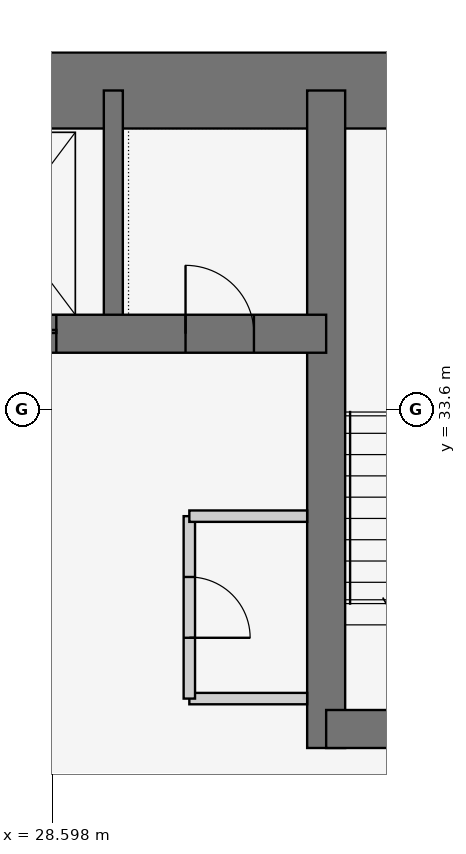
"""IFC4 building model, lengths in metres.
Left out: names, types, materials, properties, quantities, classifications, styles, units other than length and angle.
Written with IfcOpenShell. Run it as: python <this file> out.ifc"""

import sys

from ifc_helpers import new_model, si_unit, direction, frame, frame_2d, origin, place, context, subcontext, project, spatial, rectangle, extrude, element, fill, save


model = new_model("IFC4")
c1 = context("Model", 3, precision=1e-05, world=origin(), true_north=direction((0.0, 1.0)))
c2 = subcontext(c1, "Body", "Model", "MODEL_VIEW")
j1 = project(units=[si_unit("LENGTHUNIT", "METRE"), si_unit("PLANEANGLEUNIT", "RADIAN")], contexts=[c1])
p1 = place(None, origin())
s1 = spatial("IfcSite", under=j1, at=p1, CompositionType="ELEMENT")
p2 = place(p1, origin())
s2 = spatial("IfcBuilding", under=s1, at=p2, CompositionType="ELEMENT")
p3 = place(p2, frame((0.0, 0.0, 66.9)))
s3 = spatial("IfcBuildingStorey", under=s2, at=p3, CompositionType="ELEMENT", Elevation=66.9)
p4 = place(p3, frame((37.8, 37.8, 0.0), z_axis=(0.0, 0.0, 1.0), x_axis=(-1.0, 0.0, 0.0)))
e1 = element("IfcWall", 1, at=p4, inside=s3, PredefinedType="SHEAR", context=c2, shape_type="SweptSolid", body=[
    extrude(rectangle(XDim=17.3, YDim=1.0, at=frame_2d((8.65, 0.0))), origin(), (0.0, 0.0, 1.0), 3.6),
])
p5 = place(p3, frame((21.0, 34.6, 0.0), z_axis=(0.0, 0.0, 1.0), x_axis=(1.0, 0.0, 0.0)))
e2 = element("IfcWall", 2, at=p5, inside=s3, PredefinedType="SHEAR", context=c2, shape_type="SweptSolid", body=[
    extrude(rectangle(XDim=11.2, YDim=0.5, at=frame_2d((5.6, 0.0))), origin(), (0.0, 0.0, 1.0), 3.6),
])
p6 = place(p5, frame((9.35, 0.0, 0.0)))
e3 = element("IfcOpeningElement", 3, at=p6, cuts=e2, PredefinedType="OPENING", context=c2, shape_type="SweptSolid", body=[
    extrude(rectangle(XDim=0.9, YDim=2.1, at=frame_2d((0.45, 1.05))), frame((0.0, 0.26, 0.0), z_axis=(0.0, -1.0, 0.0), x_axis=(1.0, 0.0, 0.0)), (0.0, 0.0, 1.0), 0.52),
])
p7 = place(p5, frame((1.0, 0.0, 0.0)))
e4 = element("IfcOpeningElement", 4, at=p7, cuts=e2, PredefinedType="OPENING", context=c2, shape_type="SweptSolid", body=[
    extrude(rectangle(XDim=1.1, YDim=2.1, at=frame_2d((0.55, 1.05))), frame((0.0, 0.26, 0.0), z_axis=(0.0, -1.0, 0.0), x_axis=(1.0, 0.0, 0.0)), (0.0, 0.0, 1.0), 0.52),
])
p8 = place(p5, frame((3.65, 0.0, 0.0)))
e5 = element("IfcOpeningElement", 5, at=p8, cuts=e2, PredefinedType="OPENING", context=c2, shape_type="SweptSolid", body=[
    extrude(rectangle(XDim=1.1, YDim=2.1, at=frame_2d((0.55, 1.05))), frame((0.0, 0.26, 0.0), z_axis=(0.0, -1.0, 0.0), x_axis=(1.0, 0.0, 0.0)), (0.0, 0.0, 1.0), 0.52),
])
p9 = place(p5, frame((6.35, 0.0, 0.0)))
e6 = element("IfcOpeningElement", 6, at=p9, cuts=e2, PredefinedType="OPENING", context=c2, shape_type="SweptSolid", body=[
    extrude(rectangle(XDim=1.3, YDim=2.1, at=frame_2d((0.65, 1.05))), frame((0.0, 0.26, 0.0), z_axis=(0.0, -1.0, 0.0), x_axis=(1.0, 0.0, 0.0)), (0.0, 0.0, 1.0), 0.52),
])
p10 = place(p3, frame((32.2, 29.15, 0.0), z_axis=(0.0, 0.0, 1.0), x_axis=(0.0, 1.0, 0.0)))
e7 = element("IfcWall", 7, at=p10, inside=s3, PredefinedType="SHEAR", context=c2, shape_type="SweptSolid", body=[
    extrude(rectangle(XDim=8.65, YDim=0.5, at=frame_2d((4.325, 0.0))), origin(), (0.0, 0.0, 1.0), 3.6),
])
p11 = place(p3, frame((32.2, 29.4, 0.0), z_axis=(0.0, 0.0, 1.0), x_axis=(1.0, 0.0, 0.0)))
e8 = element("IfcWall", 8, at=p11, inside=s3, PredefinedType="SHEAR", context=c2, shape_type="SweptSolid", body=[
    extrude(rectangle(XDim=5.6, YDim=0.5, at=frame_2d((2.8, 0.0))), origin(), (0.0, 0.0, 1.0), 3.6),
])
p12 = place(p11, frame((2.0, 0.0, 0.0)))
e9 = element("IfcOpeningElement", 9, at=p12, cuts=e8, PredefinedType="OPENING", context=c2, shape_type="SweptSolid", body=[
    extrude(rectangle(XDim=1.2, YDim=2.1, at=frame_2d((0.6, 1.05))), frame((0.0, 0.26, 0.0), z_axis=(0.0, -1.0, 0.0), x_axis=(1.0, 0.0, 0.0)), (0.0, 0.0, 1.0), 0.52),
])
p13 = place(p3, frame((29.4, 34.6, 0.0), z_axis=(0.0, 0.0, 1.0), x_axis=(0.0, 1.0, 0.0)))
e10 = element("IfcWall", 10, at=p13, inside=s3, PredefinedType="SHEAR", context=c2, shape_type="SweptSolid", body=[
    extrude(rectangle(XDim=3.2, YDim=0.25, at=frame_2d((1.6, 0.0))), origin(), (0.0, 0.0, 1.0), 3.6),
])
p14 = place(p3, frame((31.95, 29.8, 0.0), z_axis=(0.0, 0.0, 1.0), x_axis=(-1.0, 0.0, 0.0)))
e11 = element("IfcWall", 11, at=p14, inside=s3, PredefinedType="PARTITIONING", context=c2, shape_type="SweptSolid", body=[
    extrude(rectangle(XDim=1.55, YDim=0.15, at=frame_2d((0.775, 0.0))), origin(), (0.0, 0.0, 1.0), 3.45),
])
p15 = place(p3, frame((30.4, 29.8, 0.0), z_axis=(0.0, 0.0, 1.0), x_axis=(0.0, 1.0, 0.0)))
e12 = element("IfcWall", 12, at=p15, inside=s3, PredefinedType="PARTITIONING", context=c2, shape_type="SweptSolid", body=[
    extrude(rectangle(XDim=2.4, YDim=0.15, at=frame_2d((1.2, 0.0))), origin(), (0.0, 0.0, 1.0), 3.45),
])
p16 = place(p15, frame((0.8, 0.0, 0.0)))
e13 = element("IfcOpeningElement", 13, at=p16, cuts=e12, PredefinedType="OPENING", context=c2, shape_type="SweptSolid", body=[
    extrude(rectangle(XDim=0.8, YDim=2.1, at=frame_2d((0.4, 1.05))), frame((0.0, 0.085, 0.0), z_axis=(0.0, -1.0, 0.0), x_axis=(1.0, 0.0, 0.0)), (0.0, 0.0, 1.0), 0.17),
])
p17 = place(p3, frame((30.4, 32.2, 0.0), z_axis=(0.0, 0.0, 1.0), x_axis=(1.0, 0.0, 0.0)))
e14 = element("IfcWall", 14, at=p17, inside=s3, PredefinedType="PARTITIONING", context=c2, shape_type="SweptSolid", body=[
    extrude(rectangle(XDim=1.55, YDim=0.15, at=frame_2d((0.775, 0.0))), origin(), (0.0, 0.0, 1.0), 3.45),
])
p18 = place(p6, origin())
e15 = element("IfcDoor", 15, at=p18, inside=s3, OperationType="SINGLE_SWING_LEFT", PredefinedType="DOOR", context=c2, shape_type="SweptSolid", body=[
    extrude(rectangle(XDim=0.9, YDim=2.1, at=frame_2d((0.45, 1.05))), frame((0.0, 0.025, 0.0), z_axis=(0.0, -1.0, 0.0), x_axis=(1.0, 0.0, 0.0)), (0.0, 0.0, 1.0), 0.05),
])
fill(e3, e15)
p19 = place(p16, frame((0.8, 0.0, 0.0), z_axis=(0.0, 0.0, 1.0), x_axis=(-1.0, 0.0, 0.0)))
e16 = element("IfcDoor", 16, at=p19, inside=s3, OperationType="SINGLE_SWING_RIGHT", PredefinedType="DOOR", context=c2, shape_type="SweptSolid", body=[
    extrude(rectangle(XDim=0.8, YDim=2.1, at=frame_2d((0.4, 1.05))), frame((0.0, 0.025, 0.0), z_axis=(0.0, -1.0, 0.0), x_axis=(1.0, 0.0, 0.0)), (0.0, 0.0, 1.0), 0.05),
])
fill(e13, e16)
p20 = place(p9, origin())
e17 = element("IfcDoor", 17, at=p20, inside=s3, OperationType="DOUBLE_DOOR_SLIDING", PredefinedType="DOOR", context=c2, shape_type="SweptSolid", body=[
    extrude(rectangle(XDim=1.3, YDim=2.1, at=frame_2d((0.65, 1.05))), frame((0.0, 0.025, 0.0), z_axis=(0.0, -1.0, 0.0), x_axis=(1.0, 0.0, 0.0)), (0.0, 0.0, 1.0), 0.05),
])
fill(e6, e17)
save(model, sys.argv[1])
